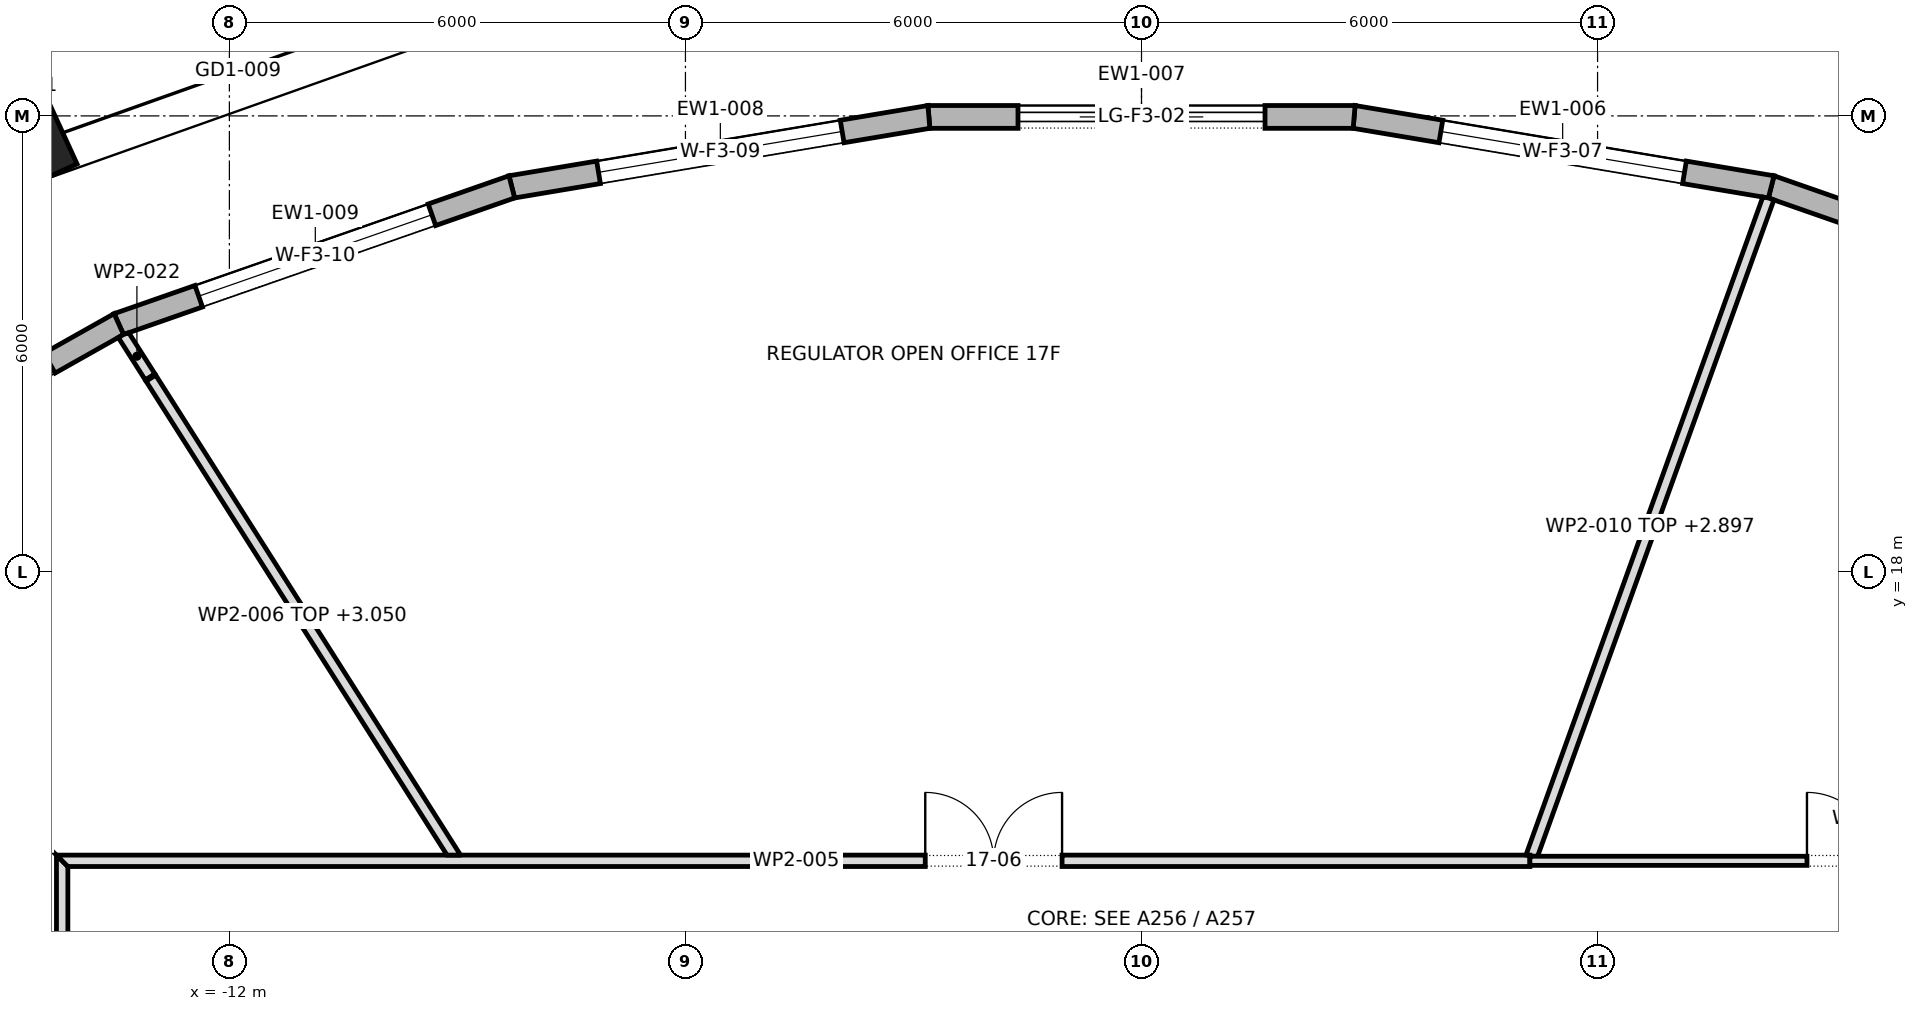
"""IFC4 building model, lengths in metres.
Left out: names, types, materials, properties, quantities, classifications, styles, units other than length and angle.
Written with IfcOpenShell. Run it as: python <this file> out.ifc"""

import sys

from ifc_helpers import new_model, si_unit, direction, frame, frame_2d, origin, origin_2d, place, context, subcontext, project, spatial, polyline, rectangle, outline, extrude, element, fill, save


model = new_model("IFC4")
c1 = context("Model", 3, precision=1e-05, world=origin(), true_north=direction((0.0, 1.0)))
c2 = subcontext(c1, "Body", "Model", "MODEL_VIEW")
j1 = project(units=[si_unit("LENGTHUNIT", "METRE"), si_unit("PLANEANGLEUNIT", "RADIAN")], contexts=[c1])
p1 = place(None, origin())
s1 = spatial("IfcSite", under=j1, at=p1, CompositionType="ELEMENT")
p2 = place(p1, origin())
s2 = spatial("IfcBuilding", under=s1, at=p2, CompositionType="ELEMENT")
p3 = place(p2, frame((0.0, 0.0, 238.9)))
s3 = spatial("IfcBuildingStorey", under=s2, at=p3, CompositionType="ELEMENT", Elevation=238.9)
p4 = place(p3, frame((-14.712, 23.593, 0.0), z_axis=(0.0, 0.0, 1.0), x_axis=(-0.909125641902, -0.416521988898, 0.0)))
e1 = element("IfcColumn", 1, at=p4, inside=s3, PredefinedType="COLUMN", context=c2, shape_type="SweptSolid", body=[
    extrude(rectangle(XDim=1.1, YDim=1.0, at=origin_2d()), origin(), (0.0, 0.0, 1.0), 4.0),
])
p5 = place(p3, frame((13.455, 21.261, 0.0), z_axis=(0.0, 0.0, 1.0), x_axis=(-0.944093730832, 0.329677156326, 0.0)))
e2 = element("IfcWall", 2, at=p5, inside=s3, PredefinedType="STANDARD", context=c2, shape_type="SweptSolid", body=[
    extrude(outline(polyline([(-0.013, -0.15), (5.489, -0.15), (5.464, 0.15), (0.013, 0.15), (-0.013, -0.15)])), origin(), (0.0, 0.0, 1.0), 3.7),
])
p6 = place(p5, frame((1.113, 0.0, 0.6)))
e3 = element("IfcOpeningElement", 3, at=p6, cuts=e2, PredefinedType="OPENING", context=c2, shape_type="SweptSolid", body=[
    extrude(rectangle(XDim=3.25, YDim=2.65, at=frame_2d((1.625, 1.325))), frame((0.0, 0.162, 0.0), z_axis=(0.0, -1.0, 0.0), x_axis=(1.0, 0.0, 0.0)), (0.0, 0.0, 1.0), 0.324),
])
p7 = place(p3, frame((8.284, 23.066, 0.0), z_axis=(0.0, 0.0, 1.0), x_axis=(-0.98622977737, 0.16538085206, 0.0)))
e4 = element("IfcWall", 4, at=p7, inside=s3, PredefinedType="STANDARD", context=c2, shape_type="SweptSolid", body=[
    extrude(outline(polyline([(-0.013, -0.15), (5.576, -0.15), (5.552, 0.15), (0.013, 0.15), (-0.013, -0.15)])), origin(), (0.0, 0.0, 1.0), 3.7),
])
p8 = place(p7, frame((1.157, 0.0, 0.6)))
e5 = element("IfcOpeningElement", 5, at=p8, cuts=e4, PredefinedType="OPENING", context=c2, shape_type="SweptSolid", body=[
    extrude(rectangle(XDim=3.25, YDim=2.65, at=frame_2d((1.625, 1.325))), frame((0.0, 0.162, 0.0), z_axis=(0.0, -1.0, 0.0), x_axis=(1.0, 0.0, 0.0)), (0.0, 0.0, 1.0), 0.324),
])
p9 = place(p3, frame((2.797, 23.987, 0.0), z_axis=(0.0, 0.0, 1.0), x_axis=(-1.0, 0.0, 0.0)))
e6 = element("IfcWall", 6, at=p9, inside=s3, PredefinedType="STANDARD", context=c2, shape_type="SweptSolid", body=[
    extrude(outline(polyline([(-0.012, -0.15), (5.607, -0.15), (5.582, 0.15), (0.012, 0.15), (-0.012, -0.15)])), origin(), (0.0, 0.0, 1.0), 3.7),
])
p10 = place(p9, frame((1.172, 0.0, 0.0)))
e7 = element("IfcOpeningElement", 7, at=p10, cuts=e6, PredefinedType="OPENING", context=c2, shape_type="SweptSolid", body=[
    extrude(rectangle(XDim=3.25, YDim=3.25, at=frame_2d((1.625, 1.625))), frame((0.0, 0.162, 0.0), z_axis=(0.0, -1.0, 0.0), x_axis=(1.0, 0.0, 0.0)), (0.0, 0.0, 1.0), 0.324),
])
p11 = place(p3, frame((-2.797, 23.987, 0.0), z_axis=(0.0, 0.0, 1.0), x_axis=(-0.98622977737, -0.16538085206, 0.0)))
e8 = element("IfcWall", 8, at=p11, inside=s3, PredefinedType="STANDARD", context=c2, shape_type="SweptSolid", body=[
    extrude(outline(polyline([(-0.012, -0.15), (5.577, -0.15), (5.551, 0.15), (0.012, 0.15), (-0.012, -0.15)])), origin(), (0.0, 0.0, 1.0), 3.7),
])
p12 = place(p11, frame((1.157, 0.0, 0.6)))
e9 = element("IfcOpeningElement", 9, at=p12, cuts=e8, PredefinedType="OPENING", context=c2, shape_type="SweptSolid", body=[
    extrude(rectangle(XDim=3.25, YDim=2.65, at=frame_2d((1.625, 1.325))), frame((0.0, 0.162, 0.0), z_axis=(0.0, -1.0, 0.0), x_axis=(1.0, 0.0, 0.0)), (0.0, 0.0, 1.0), 0.324),
])
p13 = place(p3, frame((-8.284, 23.066, 0.0), z_axis=(0.0, 0.0, 1.0), x_axis=(-0.944093730832, -0.329677156326, 0.0)))
e10 = element("IfcWall", 10, at=p13, inside=s3, PredefinedType="STANDARD", context=c2, shape_type="SweptSolid", body=[
    extrude(outline(polyline([(-0.013, -0.15), (5.49, -0.15), (5.463, 0.15), (0.013, 0.15), (-0.013, -0.15)])), origin(), (0.0, 0.0, 1.0), 3.7),
])
p14 = place(p13, frame((1.113, 0.0, 0.6)))
e11 = element("IfcOpeningElement", 11, at=p14, cuts=e10, PredefinedType="OPENING", context=c2, shape_type="SweptSolid", body=[
    extrude(rectangle(XDim=3.25, YDim=2.65, at=frame_2d((1.625, 1.325))), frame((0.0, 0.162, 0.0), z_axis=(0.0, -1.0, 0.0), x_axis=(1.0, 0.0, 0.0)), (0.0, 0.0, 1.0), 0.324),
])
p15 = place(p3, frame((-13.455, 21.261, 0.0), z_axis=(0.0, 0.0, 1.0), x_axis=(-0.871275151053, -0.490794876865, 0.0)))
e12 = element("IfcWall", 12, at=p15, inside=s3, PredefinedType="STANDARD", context=c2, shape_type="SweptSolid", body=[
    extrude(outline(polyline([(-0.013, -0.15), (5.357, -0.15), (5.328, 0.15), (0.013, 0.15), (-0.013, -0.15)])), origin(), (0.0, 0.0, 1.0), 3.7),
])
p16 = place(p15, frame((1.046, 0.0, 0.6)))
e13 = element("IfcOpeningElement", 13, at=p16, cuts=e12, PredefinedType="OPENING", context=c2, shape_type="SweptSolid", body=[
    extrude(rectangle(XDim=3.25, YDim=2.65, at=frame_2d((1.625, 1.325))), frame((0.0, 0.162, 0.0), z_axis=(0.0, -1.0, 0.0), x_axis=(1.0, 0.0, 0.0)), (0.0, 0.0, 1.0), 0.324),
])
p17 = place(p3, frame((-14.2, 1.098, 0.0), z_axis=(0.0, 0.0, 1.0), x_axis=(0.0, 1.0, 0.0)))
e14 = element("IfcWall", 14, at=p17, inside=s3, PredefinedType="PARTITIONING", context=c2, shape_type="SweptSolid", body=[
    extrude(outline(polyline([(0.0, -0.075), (1.861, -0.075), (3.722, -0.075), (5.583, -0.075), (7.444, -0.075), (9.305, -0.075), (11.166, -0.075), (13.027, -0.075), (13.177, 0.075), (11.317, 0.075), (9.458, 0.075), (7.599, 0.075), (5.74, 0.075), (3.881, 0.075), (2.022, 0.075), (0.163, 0.075), (0.0, -0.075)])), origin(), (0.0, 0.0, 1.0), 3.7),
])
p18 = place(p3, frame((-14.275, 14.2, 0.0), z_axis=(0.0, 0.0, 1.0), x_axis=(1.0, 0.0, 0.0)))
e15 = element("IfcWall", 15, at=p18, inside=s3, PredefinedType="PARTITIONING", context=c2, shape_type="SweptSolid", body=[
    extrude(outline(polyline([(19.385, 0.075), (17.447, 0.075), (15.508, 0.075), (13.57, 0.075), (11.631, 0.075), (9.692, 0.075), (7.754, 0.075), (5.815, 0.075), (3.877, 0.075), (1.938, 0.075), (0.0, 0.075), (0.15, -0.075), (2.073, -0.075), (3.997, -0.075), (5.92, -0.075), (7.844, -0.075), (9.768, -0.075), (11.691, -0.075), (13.615, -0.075), (15.538, -0.075), (17.461, -0.075), (19.385, -0.075), (19.385, 0.075)])), origin(), (0.0, 0.0, 1.0), 3.7),
])
p19 = place(p18, frame((11.43, 0.0, 0.0)))
e16 = element("IfcOpeningElement", 16, at=p19, cuts=e15, PredefinedType="OPENING", context=c2, shape_type="SweptSolid", body=[
    extrude(rectangle(XDim=1.8, YDim=2.1, at=frame_2d((0.9, 1.05))), frame((0.0, 0.087, 0.0), z_axis=(0.0, -1.0, 0.0), x_axis=(1.0, 0.0, 0.0)), (0.0, 0.0, 1.0), 0.174),
])
p20 = place(p3, frame((-9.022, 14.235, 0.0), z_axis=(0.0, 0.0, 1.0), x_axis=(-0.536113951256, 0.844145622075, 0.0)))
e17 = element("IfcWall", 17, at=p20, inside=s3, PredefinedType="PARTITIONING", context=c2, shape_type="SweptSolid", body=[
    extrude(outline(polyline([(7.491, 0.075), (5.642, 0.075), (3.793, 0.075), (1.944, 0.075), (0.095, 0.075), (0.0, -0.074), (0.0, -0.075), (1.873, -0.075), (3.745, -0.075), (5.618, -0.075), (7.491, -0.075), (7.491, 0.075)])), origin(), (0.0, 0.0, 1.0), 3.05),
])
p21 = place(p3, frame((5.128, 14.25, 0.0), z_axis=(0.0, 0.0, 1.0), x_axis=(0.33871853012, 0.940887749603, 0.0)))
e18 = element("IfcWall", 18, at=p21, inside=s3, PredefinedType="PARTITIONING", context=c2, shape_type="SweptSolid", body=[
    extrude(outline(polyline([(9.215, -0.075), (9.215, -0.061), (9.215, 0.002), (9.201, 0.075), (7.361, 0.075), (5.521, 0.075), (3.68, 0.075), (1.84, 0.075), (0.0, 0.075), (0.0, 0.074), (0.017, 0.025), (0.003, 0.02), (0.038, -0.075), (1.873, -0.075), (3.708, -0.075), (5.544, -0.075), (7.38, -0.075), (9.215, -0.075)])), origin(), (0.0, 0.0, 1.0), 2.897),
])
p22 = place(p3, frame((5.11, 14.2, 0.0), z_axis=(0.0, 0.0, 1.0), x_axis=(1.0, 0.0, 0.0)))
e19 = element("IfcWall", 19, at=p22, inside=s3, PredefinedType="PARTITIONING", context=c2, shape_type="SweptSolid", body=[
    extrude(outline(polyline([(0.0, -0.06), (1.806, -0.06), (3.612, -0.06), (5.418, -0.06), (7.224, -0.06), (9.03, -0.06), (9.15, 0.06), (7.32, 0.06), (5.49, 0.06), (3.66, 0.06), (1.83, 0.06), (0.0, 0.06), (0.0, -0.06)])), origin(), (0.0, 0.0, 1.0), 3.7),
])
p23 = place(p22, frame((3.645, 0.0, 0.0)))
e20 = element("IfcOpeningElement", 20, at=p23, cuts=e19, PredefinedType="OPENING", context=c2, shape_type="SweptSolid", body=[
    extrude(rectangle(XDim=1.8, YDim=2.1, at=frame_2d((0.9, 1.05))), frame((0.0, 0.072, 0.0), z_axis=(0.0, -1.0, 0.0), x_axis=(1.0, 0.0, 0.0)), (0.0, 0.0, 1.0), 0.144),
])
p24 = place(p3, frame((-13.038, 20.558, 0.0), z_axis=(0.0, 0.0, 1.0), x_axis=(-0.536263285698, 0.844050761751, 0.0)))
e21 = element("IfcWall", 21, at=p24, inside=s3, PredefinedType="PARTITIONING", context=c2, shape_type="SweptSolid", body=[
    extrude(outline(polyline([(0.0, -0.075), (0.651, -0.075), (0.667, -0.004), (0.671, 0.069), (0.671, 0.075), (0.0, 0.075), (0.0, -0.075)])), origin(), (0.0, 0.0, 1.0), 3.7),
])
p25 = place(p8, origin())
e22 = element("IfcWindow", 22, at=p25, inside=s3, PartitioningType="TRIPLE_PANEL_VERTICAL", PredefinedType="WINDOW", context=c2, shape_type="SweptSolid", body=[
    extrude(rectangle(XDim=3.25, YDim=2.65, at=frame_2d((1.625, 1.325))), frame((0.0, 0.03, 0.0), z_axis=(0.0, -1.0, 0.0), x_axis=(1.0, 0.0, 0.0)), (0.0, 0.0, 1.0), 0.06),
])
fill(e5, e22)
p26 = place(p10, origin())
e23 = element("IfcDoor", 23, at=p26, inside=s3, OperationType="DOUBLE_DOOR_SLIDING", PredefinedType="DOOR", context=c2, shape_type="SweptSolid", body=[
    extrude(rectangle(XDim=3.25, YDim=3.25, at=frame_2d((1.625, 1.625))), frame((0.0, 0.025, 0.0), z_axis=(0.0, -1.0, 0.0), x_axis=(1.0, 0.0, 0.0)), (0.0, 0.0, 1.0), 0.05),
])
fill(e7, e23)
p27 = place(p12, origin())
e24 = element("IfcWindow", 24, at=p27, inside=s3, PartitioningType="TRIPLE_PANEL_VERTICAL", PredefinedType="WINDOW", context=c2, shape_type="SweptSolid", body=[
    extrude(rectangle(XDim=3.25, YDim=2.65, at=frame_2d((1.625, 1.325))), frame((0.0, 0.03, 0.0), z_axis=(0.0, -1.0, 0.0), x_axis=(1.0, 0.0, 0.0)), (0.0, 0.0, 1.0), 0.06),
])
fill(e9, e24)
p28 = place(p14, origin())
e25 = element("IfcWindow", 25, at=p28, inside=s3, PartitioningType="TRIPLE_PANEL_VERTICAL", PredefinedType="WINDOW", context=c2, shape_type="SweptSolid", body=[
    extrude(rectangle(XDim=3.25, YDim=2.65, at=frame_2d((1.625, 1.325))), frame((0.0, 0.03, 0.0), z_axis=(0.0, -1.0, 0.0), x_axis=(1.0, 0.0, 0.0)), (0.0, 0.0, 1.0), 0.06),
])
fill(e11, e25)
p29 = place(p23, origin())
e26 = element("IfcDoor", 26, at=p29, inside=s3, OperationType="DOUBLE_DOOR_SINGLE_SWING", PredefinedType="DOOR", context=c2, shape_type="SweptSolid", body=[
    extrude(rectangle(XDim=1.8, YDim=2.1, at=frame_2d((0.9, 1.05))), frame((0.0, 0.025, 0.0), z_axis=(0.0, -1.0, 0.0), x_axis=(1.0, 0.0, 0.0)), (0.0, 0.0, 1.0), 0.05),
])
fill(e20, e26)
p30 = place(p19, origin())
e27 = element("IfcDoor", 27, at=p30, inside=s3, OperationType="DOUBLE_DOOR_SINGLE_SWING", PredefinedType="DOOR", context=c2, shape_type="SweptSolid", body=[
    extrude(rectangle(XDim=1.8, YDim=2.1, at=frame_2d((0.9, 1.05))), frame((0.0, 0.025, 0.0), z_axis=(0.0, -1.0, 0.0), x_axis=(1.0, 0.0, 0.0)), (0.0, 0.0, 1.0), 0.05),
])
fill(e16, e27)
save(model, sys.argv[1])
